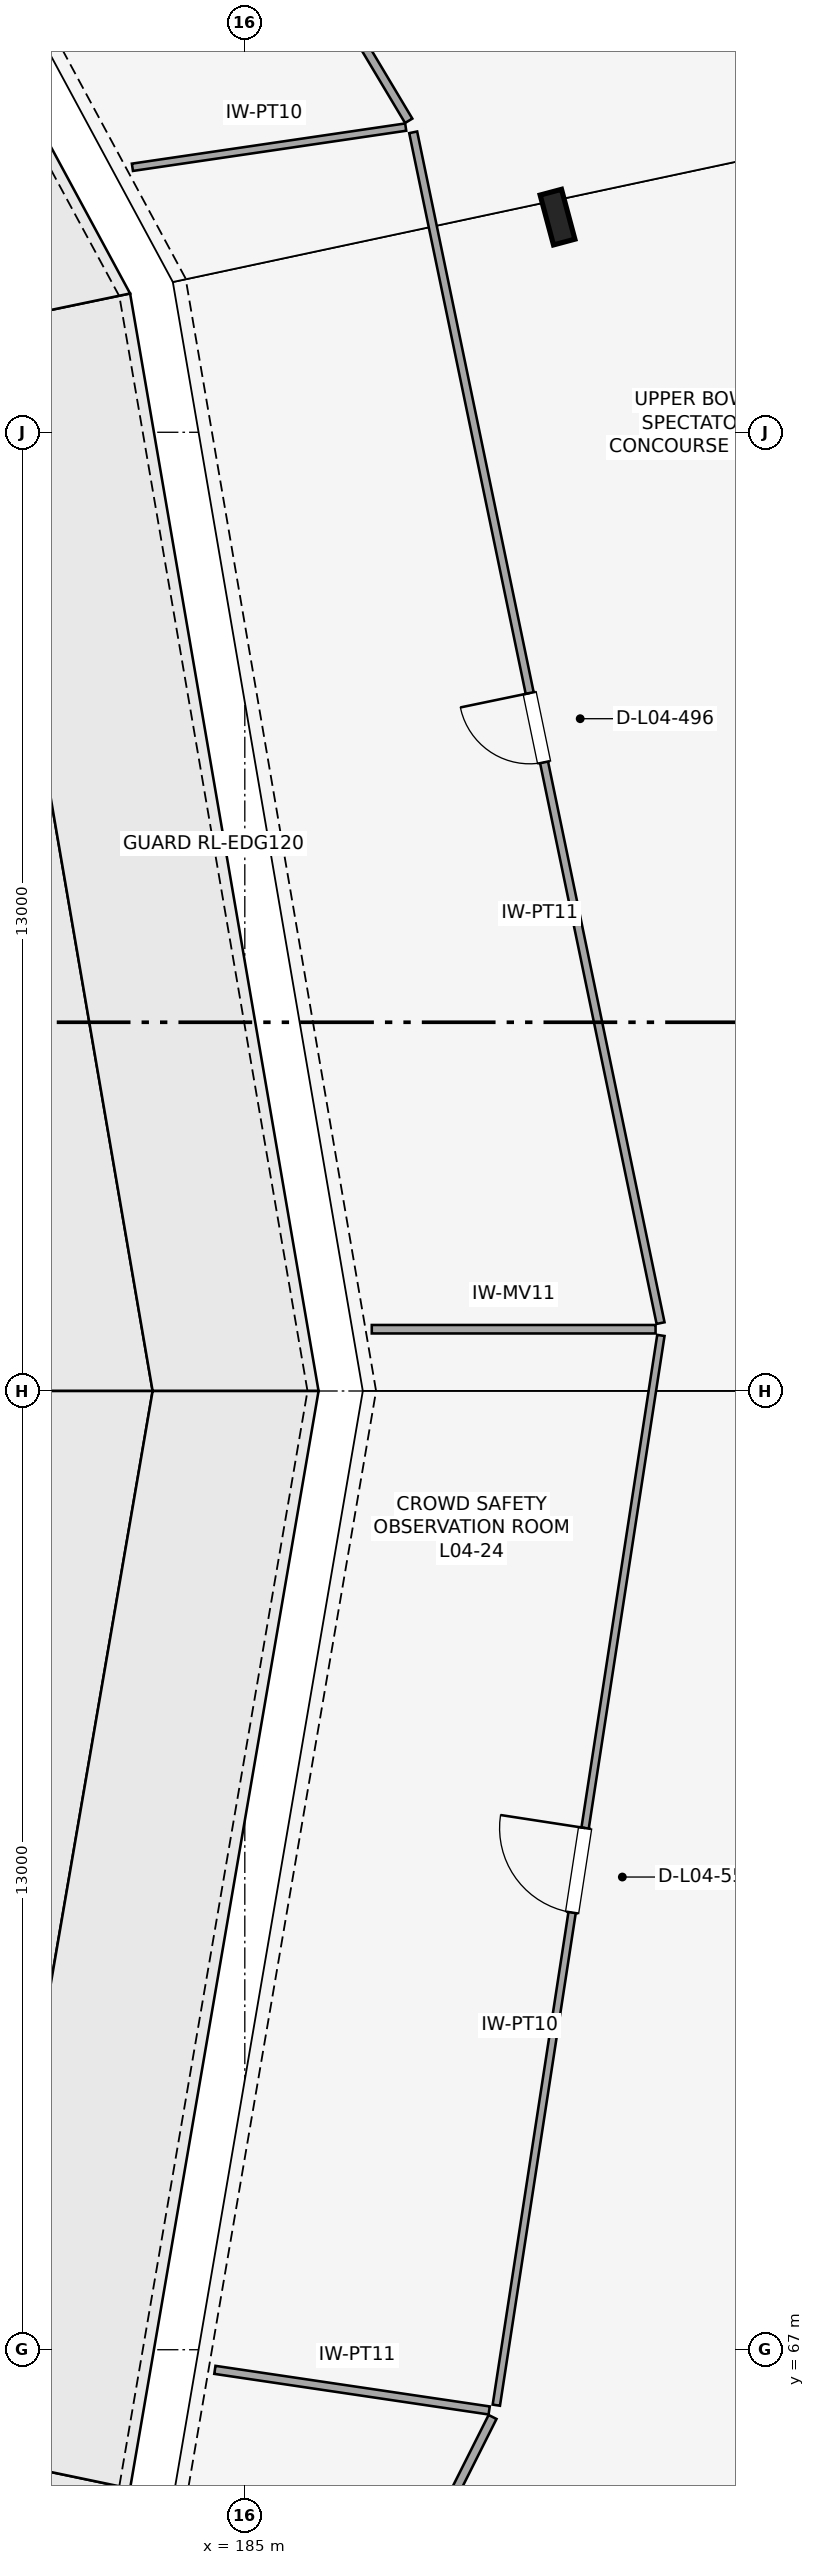
"""IFC4 building model, lengths in metres.
Left out: names, types, materials, properties, quantities, classifications, styles, units other than length and angle.
Written with IfcOpenShell. Run it as: python <this file> out.ifc"""

import sys

from ifc_helpers import new_model, si_unit, direction, frame, frame_2d, origin, origin_2d, place, context, subcontext, project, spatial, rectangle, i_section, extrude, element, fill, save


model = new_model("IFC4")
c1 = context("Model", 3, precision=1e-05, world=origin(), true_north=direction((0.0, 1.0)))
c2 = subcontext(c1, "Body", "Model", "MODEL_VIEW")
j1 = project(units=[si_unit("LENGTHUNIT", "METRE"), si_unit("PLANEANGLEUNIT", "RADIAN")], contexts=[c1])
p1 = place(None, origin())
s1 = spatial("IfcSite", under=j1, at=p1, CompositionType="ELEMENT")
p2 = place(p1, origin())
s2 = spatial("IfcBuilding", under=s1, at=p2, CompositionType="ELEMENT")
p3 = place(p2, frame((0.0, 0.0, 20.8)))
s3 = spatial("IfcBuildingStorey", under=s2, at=p3, CompositionType="ELEMENT", Elevation=20.8)
p4 = place(p3, frame((189.24, 95.917, 0.0), z_axis=(0.0, 0.0, 1.0), x_axis=(0.965925826289, 0.258819045103, 0.0)))
e1 = element("IfcColumn", 1, at=p4, inside=s3, PredefinedType="COLUMN", context=c2, shape_type="SweptSolid", body=[
    extrude(i_section(OverallWidth=0.3, OverallDepth=0.7, WebThickness=0.017, FlangeThickness=0.032, FilletRadius=0.027, at=origin_2d()), origin(), (0.0, 0.0, 1.0), 5.4),
])
p5 = place(p3, frame((190.637, 80.921, 0.0), z_axis=(0.0, 0.0, 1.0), x_axis=(-0.20337900125, 0.97910008776, 0.0)))
e2 = element("IfcWall", 2, at=p5, inside=s3, PredefinedType="PARTITIONING", context=c2, shape_type="SweptSolid", body=[
    extrude(rectangle(XDim=16.491, YDim=0.11, at=frame_2d((8.246, 0.0))), origin(), (0.0, 0.0, 1.0), 3.89),
])
p6 = place(p5, frame((7.766, 0.0, 0.0)))
e3 = element("IfcOpeningElement", 3, at=p6, cuts=e2, PredefinedType="OPENING", context=c2, shape_type="SweptSolid", body=[
    extrude(rectangle(XDim=0.96, YDim=2.24, at=frame_2d((0.48, 1.12))), frame((0.0, 0.065, 0.0), z_axis=(0.0, -1.0, 0.0), x_axis=(1.0, 0.0, 0.0)), (0.0, 0.0, 1.0), 0.13),
])
p7 = place(p3, frame((183.476, 96.593, 0.0), z_axis=(0.0, 0.0, 1.0), x_axis=(0.989351683465, 0.145544654403, 0.0)))
e4 = element("IfcWall", 4, at=p7, inside=s3, PredefinedType="PARTITIONING", context=c2, shape_type="SweptSolid", body=[
    extrude(rectangle(XDim=3.746, YDim=0.1, at=frame_2d((1.873, 0.0))), origin(), (0.0, 0.0, 1.0), 3.89),
])
p8 = place(p3, frame((187.222, 97.223, 0.0), z_axis=(0.0, 0.0, 1.0), x_axis=(-0.512925326117, 0.858433229685, 0.0)))
e5 = element("IfcWall", 5, at=p8, inside=s3, PredefinedType="MOVABLE", context=c2, shape_type="SweptSolid", body=[
    extrude(rectangle(XDim=16.973, YDim=0.115, at=frame_2d((8.486, 0.0))), origin(), (0.0, 0.0, 1.0), 3.89),
])
p9 = place(p8, frame((7.976, 0.0, 0.0)))
e6 = element("IfcOpeningElement", 6, at=p9, cuts=e5, PredefinedType="OPENING", context=c2, shape_type="SweptSolid", body=[
    extrude(rectangle(XDim=1.02, YDim=2.1, at=frame_2d((0.51, 1.05))), frame((0.0, 0.067, 0.0), z_axis=(0.0, -1.0, 0.0), x_axis=(1.0, 0.0, 0.0)), (0.0, 0.0, 1.0), 0.135),
])
p10 = place(p3, frame((180.698, 50.835, 0.0), z_axis=(0.0, 0.0, 1.0), x_axis=(0.448814868912, 0.893624760984, 0.0)))
e7 = element("IfcWall", 7, at=p10, inside=s3, PredefinedType="PARTITIONING", context=c2, shape_type="SweptSolid", body=[
    extrude(rectangle(XDim=17.069, YDim=0.12, at=frame_2d((8.534, 0.0))), origin(), (0.0, 0.0, 1.0), 3.89),
])
p11 = place(p10, frame((7.994, 0.0, 0.0)))
e8 = element("IfcOpeningElement", 8, at=p11, cuts=e7, PredefinedType="OPENING", context=c2, shape_type="SweptSolid", body=[
    extrude(rectangle(XDim=1.08, YDim=2.24, at=frame_2d((0.54, 1.12))), frame((0.0, 0.07, 0.0), z_axis=(0.0, -1.0, 0.0), x_axis=(1.0, 0.0, 0.0)), (0.0, 0.0, 1.0), 0.14),
])
p12 = place(p3, frame((184.594, 66.727, 0.0), z_axis=(0.0, 0.0, 1.0), x_axis=(0.989221235958, -0.146428639037, 0.0)))
e9 = element("IfcWall", 9, at=p12, inside=s3, PredefinedType="PARTITIONING", context=c2, shape_type="SweptSolid", body=[
    extrude(rectangle(XDim=3.76, YDim=0.11, at=frame_2d((1.88, 0.0))), origin(), (0.0, 0.0, 1.0), 3.89),
])
p13 = place(p3, frame((188.41, 66.248, 0.0), z_axis=(0.0, 0.0, 1.0), x_axis=(0.15203093296, 0.988375735954, 0.0)))
e10 = element("IfcWall", 10, at=p13, inside=s3, PredefinedType="PARTITIONING", context=c2, shape_type="SweptSolid", body=[
    extrude(rectangle(XDim=14.676, YDim=0.1, at=frame_2d((7.338, 0.0))), origin(), (0.0, 0.0, 1.0), 3.89),
])
p14 = place(p13, frame((6.758, 0.0, 0.0)))
e11 = element("IfcOpeningElement", 11, at=p14, cuts=e10, PredefinedType="OPENING", context=c2, shape_type="SweptSolid", body=[
    extrude(rectangle(XDim=1.16, YDim=2.1, at=frame_2d((0.58, 1.05))), frame((0.0, 0.06, 0.0), z_axis=(0.0, -1.0, 0.0), x_axis=(1.0, 0.0, 0.0)), (0.0, 0.0, 1.0), 0.12),
])
p15 = place(p3, frame((186.722, 80.838, 0.0), z_axis=(0.0, 0.0, 1.0), x_axis=(0.999999991949, -0.000126895501, 0.0)))
e12 = element("IfcWall", 12, at=p15, inside=s3, PredefinedType="MOVABLE", context=c2, shape_type="SweptSolid", body=[
    extrude(rectangle(XDim=3.848, YDim=0.115, at=frame_2d((1.924, 0.0))), origin(), (0.0, 0.0, 1.0), 3.89),
])
p16 = place(p6, origin())
e13 = element("IfcDoor", 13, at=p16, inside=s3, OperationType="SINGLE_SWING_RIGHT", PredefinedType="DOOR", context=c2, shape_type="SweptSolid", body=[
    extrude(rectangle(XDim=0.96, YDim=2.24, at=frame_2d((0.48, 1.12))), frame((0.0, 0.025, 0.0), z_axis=(0.0, -1.0, 0.0), x_axis=(1.0, 0.0, 0.0)), (0.0, 0.0, 1.0), 0.05),
])
fill(e3, e13)
p17 = place(p14, origin())
e14 = element("IfcDoor", 14, at=p17, inside=s3, OperationType="SINGLE_SWING_RIGHT", PredefinedType="DOOR", context=c2, shape_type="SweptSolid", body=[
    extrude(rectangle(XDim=1.16, YDim=2.1, at=frame_2d((0.58, 1.05))), frame((0.0, 0.025, 0.0), z_axis=(0.0, -1.0, 0.0), x_axis=(1.0, 0.0, 0.0)), (0.0, 0.0, 1.0), 0.05),
])
fill(e11, e14)
save(model, sys.argv[1])
